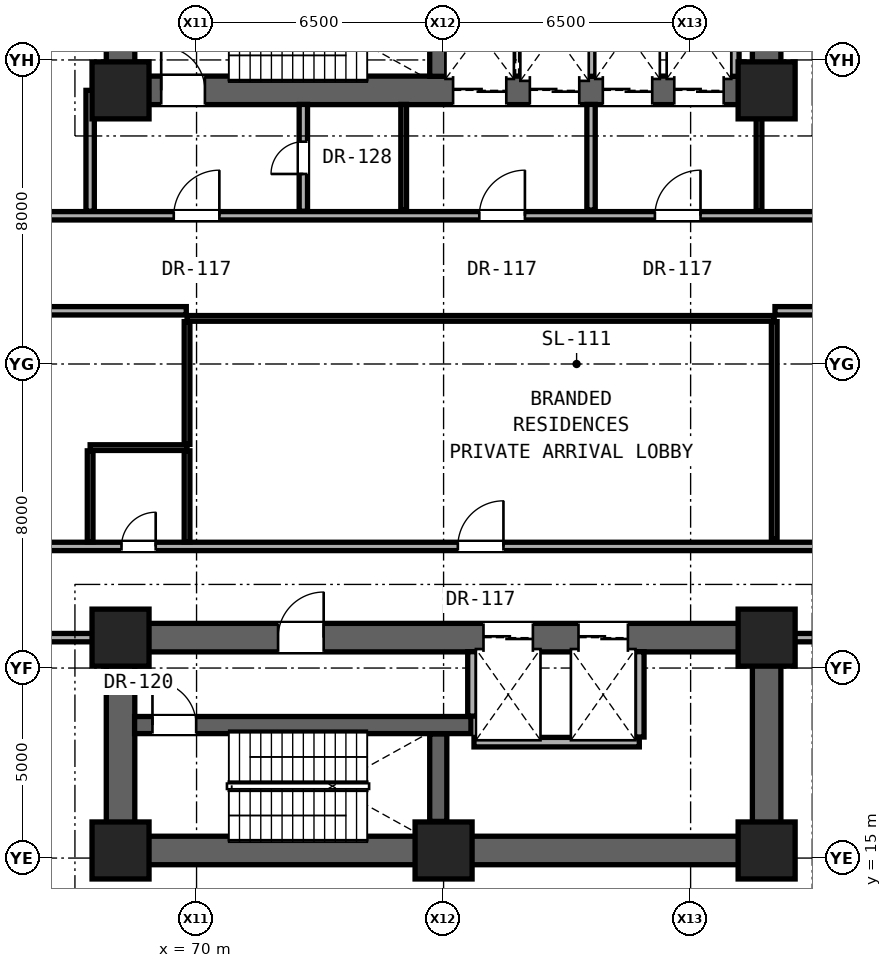
"""IFC4 building model, lengths in metres.
Left out: names, types, materials, properties, quantities, classifications, styles, units other than length and angle.
Written with IfcOpenShell. Run it as: python <this file> out.ifc"""

import sys

from ifc_helpers import new_model, si_unit, direction, frame, frame_2d, origin, origin_2d, place, context, subcontext, project, spatial, rectangle, extrude, element, fill, save


model = new_model("IFC4")
c1 = context("Model", 3, precision=1e-05, world=origin(), true_north=direction((0.0, 1.0)))
c2 = subcontext(c1, "Body", "Model", "MODEL_VIEW")
j1 = project(units=[si_unit("LENGTHUNIT", "METRE"), si_unit("PLANEANGLEUNIT", "RADIAN")], contexts=[c1])
p1 = place(None, origin())
s1 = spatial("IfcSite", under=j1, at=p1, CompositionType="ELEMENT")
p2 = place(p1, origin())
s2 = spatial("IfcBuilding", under=s1, at=p2, CompositionType="ELEMENT")
p3 = place(p2, origin())
s3 = spatial("IfcBuildingStorey", under=s2, at=p3, CompositionType="ELEMENT", Elevation=0.0)
for number, where, z_axis, x_axis in (
    (1, (68.0, 15.2, 0.0), (0.0, 0.0, 1.0), (1.0, 0.0, 0.0)),
    (2, (76.5, 15.2, 0.0), (0.0, 0.0, 1.0), (1.0, 0.0, 0.0)),
    (3, (85.0, 15.2, 0.0), (0.0, 0.0, 1.0), (1.0, 0.0, 0.0)),
    (4, (68.0, 20.8, 0.0), (0.0, 0.0, 1.0), (1.0, 0.0, 0.0)),
    (5, (85.0, 20.8, 0.0), (0.0, 0.0, 1.0), (1.0, 0.0, 0.0)),
    (6, (68.0, 35.2, 0.0), (0.0, 0.0, 1.0), (1.0, 0.0, 0.0)),
    (7, (85.0, 35.2, 0.0), (0.0, 0.0, 1.0), (1.0, 0.0, 0.0)),
):
    element("IfcColumn", number, at=place(p3, frame(where, z_axis=z_axis, x_axis=x_axis)), inside=s3, PredefinedType="COLUMN", context=c2, shape_type="SweptSolid", body=[
        extrude(rectangle(XDim=1.5, YDim=1.5, at=origin_2d()), origin(), (0.0, 0.0, 1.0), 5.2),
    ])
for number, where, z_axis, x_axis in (
    (8, (68.0, 35.2, 0.0), (0.0, 0.0, 1.0), (0.0, 1.0, 0.0)),
    (9, (85.0, 35.2, 0.0), (0.0, 0.0, 1.0), (0.0, 1.0, 0.0)),
):
    element("IfcWall", number, at=place(p3, frame(where, z_axis=z_axis, x_axis=x_axis)), inside=s3, PredefinedType="SHEAR", context=c2, shape_type="SweptSolid", body=[
        extrude(rectangle(XDim=5.6, YDim=0.75, at=frame_2d((2.8, 0.0))), origin(), (0.0, 0.0, 1.0), 4.88),
    ])
p4 = place(p3, frame((68.0, 35.2, 0.0), z_axis=(0.0, 0.0, 1.0), x_axis=(1.0, 0.0, 0.0)))
e10 = element("IfcWall", 10, at=p4, inside=s3, PredefinedType="SHEAR", context=c2, shape_type="SweptSolid", body=[
    extrude(rectangle(XDim=17.0, YDim=0.75, at=frame_2d((8.5, 0.0))), origin(), (0.0, 0.0, 1.0), 4.88),
])
p5 = place(p4, frame((1.07, 0.0, 0.0)))
e11 = element("IfcOpeningElement", 11, at=p5, cuts=e10, PredefinedType="OPENING", context=c2, shape_type="SweptSolid", body=[
    extrude(rectangle(XDim=1.15, YDim=2.2, at=frame_2d((0.575, 1.1))), frame((0.0, 0.385, 0.0), z_axis=(0.0, -1.0, 0.0), x_axis=(1.0, 0.0, 0.0)), (0.0, 0.0, 1.0), 0.77),
])
p6 = place(p4, frame((8.75, 0.0, 0.0)))
e12 = element("IfcOpeningElement", 12, at=p6, cuts=e10, PredefinedType="OPENING", context=c2, shape_type="SweptSolid", body=[
    extrude(rectangle(XDim=1.4, YDim=2.35, at=frame_2d((0.7, 1.175))), frame((0.0, 0.385, 0.0), z_axis=(0.0, -1.0, 0.0), x_axis=(1.0, 0.0, 0.0)), (0.0, 0.0, 1.0), 0.77),
])
p7 = place(p4, frame((10.77, 0.0, 0.0)))
e13 = element("IfcOpeningElement", 13, at=p7, cuts=e10, PredefinedType="OPENING", context=c2, shape_type="SweptSolid", body=[
    extrude(rectangle(XDim=1.3, YDim=2.3, at=frame_2d((0.65, 1.15))), frame((0.0, 0.385, 0.0), z_axis=(0.0, -1.0, 0.0), x_axis=(1.0, 0.0, 0.0)), (0.0, 0.0, 1.0), 0.77),
])
p8 = place(p4, frame((12.69, 0.0, 0.0)))
e14 = element("IfcOpeningElement", 14, at=p8, cuts=e10, PredefinedType="OPENING", context=c2, shape_type="SweptSolid", body=[
    extrude(rectangle(XDim=1.3, YDim=2.3, at=frame_2d((0.65, 1.15))), frame((0.0, 0.385, 0.0), z_axis=(0.0, -1.0, 0.0), x_axis=(1.0, 0.0, 0.0)), (0.0, 0.0, 1.0), 0.77),
])
p9 = place(p4, frame((14.57, 0.0, 0.0)))
e15 = element("IfcOpeningElement", 15, at=p9, cuts=e10, PredefinedType="OPENING", context=c2, shape_type="SweptSolid", body=[
    extrude(rectangle(XDim=1.3, YDim=2.3, at=frame_2d((0.65, 1.15))), frame((0.0, 0.385, 0.0), z_axis=(0.0, -1.0, 0.0), x_axis=(1.0, 0.0, 0.0)), (0.0, 0.0, 1.0), 0.77),
])
p10 = place(p3, frame((68.0, 15.2, 0.0), z_axis=(0.0, 0.0, 1.0), x_axis=(1.0, 0.0, 0.0)))
e16 = element("IfcWall", 16, at=p10, inside=s3, PredefinedType="SHEAR", context=c2, shape_type="SweptSolid", body=[
    extrude(rectangle(XDim=17.0, YDim=0.75, at=frame_2d((8.5, 0.0))), origin(), (0.0, 0.0, 1.0), 4.88),
])
for number, where, z_axis, x_axis in (
    (17, (68.0, 15.2, 0.0), (0.0, 0.0, 1.0), (0.0, 1.0, 0.0)),
    (18, (85.0, 15.2, 0.0), (0.0, 0.0, 1.0), (0.0, 1.0, 0.0)),
):
    element("IfcWall", number, at=place(p3, frame(where, z_axis=z_axis, x_axis=x_axis)), inside=s3, PredefinedType="SHEAR", context=c2, shape_type="SweptSolid", body=[
        extrude(rectangle(XDim=5.6, YDim=0.75, at=frame_2d((2.8, 0.0))), origin(), (0.0, 0.0, 1.0), 4.88),
    ])
p11 = place(p3, frame((68.0, 20.8, 0.0), z_axis=(0.0, 0.0, 1.0), x_axis=(1.0, 0.0, 0.0)))
e19 = element("IfcWall", 19, at=p11, inside=s3, PredefinedType="SHEAR", context=c2, shape_type="SweptSolid", body=[
    extrude(rectangle(XDim=17.0, YDim=0.75, at=frame_2d((8.5, 0.0))), origin(), (0.0, 0.0, 1.0), 4.88),
])
p12 = place(p11, frame((4.145, 0.0, 0.0)))
e20 = element("IfcOpeningElement", 20, at=p12, cuts=e19, PredefinedType="OPENING", context=c2, shape_type="SweptSolid", body=[
    extrude(rectangle(XDim=1.2, YDim=2.25, at=frame_2d((0.6, 1.125))), frame((0.0, 0.385, 0.0), z_axis=(0.0, -1.0, 0.0), x_axis=(1.0, 0.0, 0.0)), (0.0, 0.0, 1.0), 0.77),
])
p13 = place(p11, frame((9.55, 0.0, 0.0)))
e21 = element("IfcOpeningElement", 21, at=p13, cuts=e19, PredefinedType="OPENING", context=c2, shape_type="SweptSolid", body=[
    extrude(rectangle(XDim=1.3, YDim=2.3, at=frame_2d((0.65, 1.15))), frame((0.0, 0.385, 0.0), z_axis=(0.0, -1.0, 0.0), x_axis=(1.0, 0.0, 0.0)), (0.0, 0.0, 1.0), 0.77),
])
p14 = place(p11, frame((12.05, 0.0, 0.0)))
e22 = element("IfcOpeningElement", 22, at=p14, cuts=e19, PredefinedType="OPENING", context=c2, shape_type="SweptSolid", body=[
    extrude(rectangle(XDim=1.3, YDim=2.3, at=frame_2d((0.65, 1.15))), frame((0.0, 0.385, 0.0), z_axis=(0.0, -1.0, 0.0), x_axis=(1.0, 0.0, 0.0)), (0.0, 0.0, 1.0), 0.77),
])
p15 = place(p3, frame((77.3, 18.05, 0.0), z_axis=(0.0, 0.0, 1.0), x_axis=(1.0, 0.0, 0.0)))
e23 = element("IfcWall", 23, at=p15, inside=s3, PredefinedType="SOLIDWALL", context=c2, shape_type="SweptSolid", body=[
    extrude(rectangle(XDim=4.35, YDim=0.25, at=frame_2d((2.175, 0.0))), origin(), (0.0, 0.0, 1.0), 4.88),
])
p16 = place(p3, frame((68.37, 18.5, 0.0), z_axis=(0.0, 0.0, 1.0), x_axis=(1.0, 0.0, 0.0)))
e24 = element("IfcWall", 24, at=p16, inside=s3, PredefinedType="SHEAR", context=c2, shape_type="SweptSolid", body=[
    extrude(rectangle(XDim=8.85, YDim=0.45, at=frame_2d((4.425, 0.0))), origin(), (0.0, 0.0, 1.0), 4.88),
])
p17 = place(p16, frame((0.47, 0.0, 0.0)))
e25 = element("IfcOpeningElement", 25, at=p17, cuts=e24, PredefinedType="OPENING", context=c2, shape_type="SweptSolid", body=[
    extrude(rectangle(XDim=1.15, YDim=2.2, at=frame_2d((0.575, 1.1))), frame((0.0, 0.235, 0.0), z_axis=(0.0, -1.0, 0.0), x_axis=(1.0, 0.0, 0.0)), (0.0, 0.0, 1.0), 0.47),
])
p18 = place(p3, frame((61.8, 20.8, 0.0), z_axis=(0.0, 0.0, 1.0), x_axis=(1.0, 0.0, 0.0)))
e26 = element("IfcWall", 26, at=p18, inside=s3, PredefinedType="SOLIDWALL", context=c2, shape_type="SweptSolid", body=[
    extrude(rectangle(XDim=5.83, YDim=0.22, at=frame_2d((2.915, 0.0))), origin(), (0.0, 0.0, 1.0), 3.772),
])
p19 = place(p3, frame((85.37, 20.8, 0.0), z_axis=(0.0, 0.0, 1.0), x_axis=(1.0, 0.0, 0.0)))
e27 = element("IfcWall", 27, at=p19, inside=s3, PredefinedType="SOLIDWALL", context=c2, shape_type="SweptSolid", body=[
    extrude(rectangle(XDim=5.58, YDim=0.22, at=frame_2d((2.79, 0.0))), origin(), (0.0, 0.0, 1.0), 3.772),
])
p20 = place(p3, frame((61.8, 23.2, 0.0), z_axis=(0.0, 0.0, 1.0), x_axis=(1.0, 0.0, 0.0)))
e28 = element("IfcWall", 28, at=p20, inside=s3, PredefinedType="SOLIDWALL", context=c2, shape_type="SweptSolid", body=[
    extrude(rectangle(XDim=29.15, YDim=0.22, at=frame_2d((14.575, 0.0))), origin(), (0.0, 0.0, 1.0), 3.945),
])
p21 = place(p20, frame((6.225, 0.0, 0.0)))
e29 = element("IfcOpeningElement", 29, at=p21, cuts=e28, PredefinedType="OPENING", context=c2, shape_type="SweptSolid", body=[
    extrude(rectangle(XDim=0.9, YDim=2.1, at=frame_2d((0.45, 1.05))), frame((0.0, 0.12, 0.0), z_axis=(0.0, -1.0, 0.0), x_axis=(1.0, 0.0, 0.0)), (0.0, 0.0, 1.0), 0.24),
])
p22 = place(p20, frame((15.075, 0.0, 0.0)))
e30 = element("IfcOpeningElement", 30, at=p22, cuts=e28, PredefinedType="OPENING", context=c2, shape_type="SweptSolid", body=[
    extrude(rectangle(XDim=1.2, YDim=2.25, at=frame_2d((0.6, 1.125))), frame((0.0, 0.12, 0.0), z_axis=(0.0, -1.0, 0.0), x_axis=(1.0, 0.0, 0.0)), (0.0, 0.0, 1.0), 0.24),
])
p23 = place(p3, frame((67.2, 25.8, 0.0), z_axis=(0.0, 0.0, 1.0), x_axis=(1.0, 0.0, 0.0)))
e31 = element("IfcWall", 31, at=p23, inside=s3, PredefinedType="PARTITIONING", context=c2, shape_type="SweptSolid", body=[
    extrude(rectangle(XDim=2.55, YDim=0.15, at=frame_2d((1.275, 0.0))), origin(), (0.0, 0.0, 1.0), 3.945),
])
p24 = place(p3, frame((69.75, 29.2, 0.0), z_axis=(0.0, 0.0, 1.0), x_axis=(1.0, 0.0, 0.0)))
e32 = element("IfcWall", 32, at=p24, inside=s3, PredefinedType="PARTITIONING", context=c2, shape_type="SweptSolid", body=[
    extrude(rectangle(XDim=15.45, YDim=0.15, at=frame_2d((7.725, 0.0))), origin(), (0.0, 0.0, 1.0), 3.945),
])
p25 = place(p3, frame((61.8, 29.4, 0.0), z_axis=(0.0, 0.0, 1.0), x_axis=(1.0, 0.0, 0.0)))
e33 = element("IfcWall", 33, at=p25, inside=s3, PredefinedType="SOLIDWALL", context=c2, shape_type="SweptSolid", body=[
    extrude(rectangle(XDim=7.93, YDim=0.22, at=frame_2d((3.965, 0.0))), origin(), (0.0, 0.0, 1.0), 3.945),
])
p26 = place(p3, frame((85.22, 29.4, 0.0), z_axis=(0.0, 0.0, 1.0), x_axis=(1.0, 0.0, 0.0)))
e34 = element("IfcWall", 34, at=p26, inside=s3, PredefinedType="SOLIDWALL", context=c2, shape_type="SweptSolid", body=[
    extrude(rectangle(XDim=5.73, YDim=0.22, at=frame_2d((2.865, 0.0))), origin(), (0.0, 0.0, 1.0), 4.016),
])
p27 = place(p3, frame((61.8, 31.9, 0.0), z_axis=(0.0, 0.0, 1.0), x_axis=(1.0, 0.0, 0.0)))
e35 = element("IfcWall", 35, at=p27, inside=s3, PredefinedType="SOLIDWALL", context=c2, shape_type="SweptSolid", body=[
    extrude(rectangle(XDim=29.15, YDim=0.22, at=frame_2d((14.575, 0.0))), origin(), (0.0, 0.0, 1.0), 3.945),
])
p28 = place(p27, frame((7.6, 0.0, 0.0)))
e36 = element("IfcOpeningElement", 36, at=p28, cuts=e35, PredefinedType="OPENING", context=c2, shape_type="SweptSolid", body=[
    extrude(rectangle(XDim=1.2, YDim=2.25, at=frame_2d((0.6, 1.125))), frame((0.0, 0.12, 0.0), z_axis=(0.0, -1.0, 0.0), x_axis=(1.0, 0.0, 0.0)), (0.0, 0.0, 1.0), 0.24),
])
p29 = place(p27, frame((20.26, 0.0, 0.0)))
e37 = element("IfcOpeningElement", 37, at=p29, cuts=e35, PredefinedType="OPENING", context=c2, shape_type="SweptSolid", body=[
    extrude(rectangle(XDim=1.2, YDim=2.25, at=frame_2d((0.6, 1.125))), frame((0.0, 0.12, 0.0), z_axis=(0.0, -1.0, 0.0), x_axis=(1.0, 0.0, 0.0)), (0.0, 0.0, 1.0), 0.24),
])
p30 = place(p27, frame((15.64, 0.0, 0.0)))
e38 = element("IfcOpeningElement", 38, at=p30, cuts=e35, PredefinedType="OPENING", context=c2, shape_type="SweptSolid", body=[
    extrude(rectangle(XDim=1.2, YDim=2.25, at=frame_2d((0.6, 1.125))), frame((0.0, 0.12, 0.0), z_axis=(0.0, -1.0, 0.0), x_axis=(1.0, 0.0, 0.0)), (0.0, 0.0, 1.0), 0.24),
])
p31 = place(p3, frame((67.2, 23.32, 0.0), z_axis=(0.0, 0.0, 1.0), x_axis=(0.0, 1.0, 0.0)))
e39 = element("IfcWall", 39, at=p31, inside=s3, PredefinedType="PARTITIONING", context=c2, shape_type="SweptSolid", body=[
    extrude(rectangle(XDim=2.395, YDim=0.15, at=frame_2d((1.198, 0.0))), origin(), (0.0, 0.0, 1.0), 4.88),
])
p32 = place(p3, frame((67.2, 32.02, 0.0), z_axis=(0.0, 0.0, 1.0), x_axis=(0.0, 1.0, 0.0)))
e40 = element("IfcWall", 40, at=p32, inside=s3, PredefinedType="SOLIDWALL", context=c2, shape_type="SweptSolid", body=[
    extrude(rectangle(XDim=3.18, YDim=0.22, at=frame_2d((1.59, 0.0))), origin(), (0.0, 0.0, 1.0), 3.772),
])
p33 = place(p3, frame((69.75, 23.32, 0.0), z_axis=(0.0, 0.0, 1.0), x_axis=(0.0, 1.0, 0.0)))
e41 = element("IfcWall", 41, at=p33, inside=s3, PredefinedType="PARTITIONING", context=c2, shape_type="SweptSolid", body=[
    extrude(rectangle(XDim=2.395, YDim=0.15, at=frame_2d((1.198, 0.0))), origin(), (0.0, 0.0, 1.0), 4.88),
])
p34 = place(p3, frame((69.75, 25.885, 0.0), z_axis=(0.0, 0.0, 1.0), x_axis=(0.0, 1.0, 0.0)))
e42 = element("IfcWall", 42, at=p34, inside=s3, PredefinedType="PARTITIONING", context=c2, shape_type="SweptSolid", body=[
    extrude(rectangle(XDim=3.23, YDim=0.15, at=frame_2d((1.615, 0.0))), origin(), (0.0, 0.0, 1.0), 3.945),
])
p35 = place(p3, frame((72.81, 32.02, 0.0), z_axis=(0.0, 0.0, 1.0), x_axis=(0.0, 1.0, 0.0)))
e43 = element("IfcWall", 43, at=p35, inside=s3, PredefinedType="SOLIDWALL", context=c2, shape_type="SweptSolid", body=[
    extrude(rectangle(XDim=2.81, YDim=0.22, at=frame_2d((1.405, 0.0))), origin(), (0.0, 0.0, 1.0), 4.88),
])
p36 = place(p35, frame((0.98, 0.0, 0.0)))
e44 = element("IfcOpeningElement", 44, at=p36, cuts=e43, PredefinedType="OPENING", context=c2, shape_type="SweptSolid", body=[
    extrude(rectangle(XDim=0.85, YDim=2.01, at=frame_2d((0.425, 1.005))), frame((0.0, 0.12, 0.0), z_axis=(0.0, -1.0, 0.0), x_axis=(1.0, 0.0, 0.0)), (0.0, 0.0, 1.0), 0.24),
])
p37 = place(p3, frame((75.45, 32.05, 0.0), z_axis=(0.0, 0.0, 1.0), x_axis=(0.0, 1.0, 0.0)))
e45 = element("IfcWall", 45, at=p37, inside=s3, PredefinedType="PARTITIONING", context=c2, shape_type="SweptSolid", body=[
    extrude(rectangle(XDim=2.78, YDim=0.15, at=frame_2d((1.39, 0.0))), origin(), (0.0, 0.0, 1.0), 4.88),
])
p38 = place(p3, frame((76.36, 15.965, 0.0), z_axis=(0.0, 0.0, 1.0), x_axis=(0.0, 1.0, 0.0)))
e46 = element("IfcWall", 46, at=p38, inside=s3, PredefinedType="SHEAR", context=c2, shape_type="SweptSolid", body=[
    extrude(rectangle(XDim=2.3, YDim=0.45, at=frame_2d((1.15, 0.0))), origin(), (0.0, 0.0, 1.0), 4.88),
])
p39 = place(p3, frame((76.36, 35.57, 0.0), z_axis=(0.0, 0.0, 1.0), x_axis=(0.0, 1.0, 0.0)))
e47 = element("IfcWall", 47, at=p39, inside=s3, PredefinedType="SHEAR", context=c2, shape_type="SweptSolid", body=[
    extrude(rectangle(XDim=2.695, YDim=0.45, at=frame_2d((1.347, 0.0))), origin(), (0.0, 0.0, 1.0), 4.88),
])
p40 = place(p3, frame((77.26, 18.735, 0.0), z_axis=(0.0, 0.0, 1.0), x_axis=(0.0, 1.0, 0.0)))
e48 = element("IfcWall", 48, at=p40, inside=s3, PredefinedType="SOLIDWALL", context=c2, shape_type="SweptSolid", body=[
    extrude(rectangle(XDim=1.695, YDim=0.25, at=frame_2d((0.847, 0.0))), origin(), (0.0, 0.0, 1.0), 4.88),
])
p41 = place(p3, frame((80.38, 32.05, 0.0), z_axis=(0.0, 0.0, 1.0), x_axis=(0.0, 1.0, 0.0)))
e49 = element("IfcWall", 49, at=p41, inside=s3, PredefinedType="SOLIDWALL", context=c2, shape_type="SweptSolid", body=[
    extrude(rectangle(XDim=2.78, YDim=0.22, at=frame_2d((1.39, 0.0))), origin(), (0.0, 0.0, 1.0), 4.88),
])
for number, where, z_axis, x_axis in (
    (50, (80.38, 35.57, 0.0), (0.0, 0.0, 1.0), (0.0, 1.0, 0.0)),
    (51, (81.65, 18.185, 0.0), (0.0, 0.0, 1.0), (0.0, 1.0, 0.0)),
    (52, (84.15, 35.57, 0.0), (0.0, 0.0, 1.0), (0.0, 1.0, 0.0)),
):
    element("IfcWall", number, at=place(p3, frame(where, z_axis=z_axis, x_axis=x_axis)), inside=s3, PredefinedType="SOLIDWALL", context=c2, shape_type="SweptSolid", body=[
        extrude(rectangle(XDim=2.245, YDim=0.25, at=frame_2d((1.123, 0.0))), origin(), (0.0, 0.0, 1.0), 4.88),
    ])
p42 = place(p3, frame((84.8, 32.02, 0.0), z_axis=(0.0, 0.0, 1.0), x_axis=(0.0, 1.0, 0.0)))
e53 = element("IfcWall", 53, at=p42, inside=s3, PredefinedType="PARTITIONING", context=c2, shape_type="SweptSolid", body=[
    extrude(rectangle(XDim=2.81, YDim=0.15, at=frame_2d((1.405, 0.0))), origin(), (0.0, 0.0, 1.0), 3.945),
])
p43 = place(p3, frame((85.2, 23.4, 0.0), z_axis=(0.0, 0.0, 1.0), x_axis=(0.0, 1.0, 0.0)))
e54 = element("IfcWall", 54, at=p43, inside=s3, PredefinedType="PARTITIONING", context=c2, shape_type="SweptSolid", body=[
    extrude(rectangle(XDim=5.715, YDim=0.15, at=frame_2d((2.857, 0.0))), origin(), (0.0, 0.0, 1.0), 3.945),
])
p44 = place(p28, origin())
e55 = element("IfcDoor", 55, at=p44, inside=s3, OperationType="SINGLE_SWING_RIGHT", PredefinedType="DOOR", context=c2, shape_type="SweptSolid", body=[
    extrude(rectangle(XDim=1.2, YDim=2.25, at=frame_2d((0.6, 1.125))), frame((0.0, 0.025, 0.0), z_axis=(0.0, -1.0, 0.0), x_axis=(1.0, 0.0, 0.0)), (0.0, 0.0, 1.0), 0.05),
])
fill(e36, e55)
p45 = place(p29, origin())
e56 = element("IfcDoor", 56, at=p45, inside=s3, OperationType="SINGLE_SWING_RIGHT", PredefinedType="DOOR", context=c2, shape_type="SweptSolid", body=[
    extrude(rectangle(XDim=1.2, YDim=2.25, at=frame_2d((0.6, 1.125))), frame((0.0, 0.025, 0.0), z_axis=(0.0, -1.0, 0.0), x_axis=(1.0, 0.0, 0.0)), (0.0, 0.0, 1.0), 0.05),
])
fill(e37, e56)
p46 = place(p5, origin())
e57 = element("IfcDoor", 57, at=p46, inside=s3, OperationType="SINGLE_SWING_LEFT", PredefinedType="DOOR", context=c2, shape_type="SweptSolid", body=[
    extrude(rectangle(XDim=1.15, YDim=2.2, at=frame_2d((0.575, 1.1))), frame((0.0, 0.025, 0.0), z_axis=(0.0, -1.0, 0.0), x_axis=(1.0, 0.0, 0.0)), (0.0, 0.0, 1.0), 0.05),
])
fill(e11, e57)
p47 = place(p30, origin())
e58 = element("IfcDoor", 58, at=p47, inside=s3, OperationType="SINGLE_SWING_RIGHT", PredefinedType="DOOR", context=c2, shape_type="SweptSolid", body=[
    extrude(rectangle(XDim=1.2, YDim=2.25, at=frame_2d((0.6, 1.125))), frame((0.0, 0.025, 0.0), z_axis=(0.0, -1.0, 0.0), x_axis=(1.0, 0.0, 0.0)), (0.0, 0.0, 1.0), 0.05),
])
fill(e38, e58)
p48 = place(p36, origin())
e59 = element("IfcDoor", 59, at=p48, inside=s3, OperationType="SINGLE_SWING_LEFT", PredefinedType="DOOR", context=c2, shape_type="SweptSolid", body=[
    extrude(rectangle(XDim=0.85, YDim=2.01, at=frame_2d((0.425, 1.005))), frame((0.0, 0.025, 0.0), z_axis=(0.0, -1.0, 0.0), x_axis=(1.0, 0.0, 0.0)), (0.0, 0.0, 1.0), 0.05),
])
fill(e44, e59)
p49 = place(p12, origin())
e60 = element("IfcDoor", 60, at=p49, inside=s3, OperationType="SINGLE_SWING_RIGHT", PredefinedType="DOOR", context=c2, shape_type="SweptSolid", body=[
    extrude(rectangle(XDim=1.2, YDim=2.25, at=frame_2d((0.6, 1.125))), frame((0.0, 0.025, 0.0), z_axis=(0.0, -1.0, 0.0), x_axis=(1.0, 0.0, 0.0)), (0.0, 0.0, 1.0), 0.05),
])
fill(e20, e60)
p50 = place(p17, origin())
e61 = element("IfcDoor", 61, at=p50, inside=s3, OperationType="SINGLE_SWING_LEFT", PredefinedType="DOOR", context=c2, shape_type="SweptSolid", body=[
    extrude(rectangle(XDim=1.15, YDim=2.2, at=frame_2d((0.575, 1.1))), frame((0.0, 0.025, 0.0), z_axis=(0.0, -1.0, 0.0), x_axis=(1.0, 0.0, 0.0)), (0.0, 0.0, 1.0), 0.05),
])
fill(e25, e61)
p51 = place(p21, origin())
e62 = element("IfcDoor", 62, at=p51, inside=s3, OperationType="SINGLE_SWING_RIGHT", PredefinedType="DOOR", context=c2, shape_type="SweptSolid", body=[
    extrude(rectangle(XDim=0.9, YDim=2.1, at=frame_2d((0.45, 1.05))), frame((0.0, 0.025, 0.0), z_axis=(0.0, -1.0, 0.0), x_axis=(1.0, 0.0, 0.0)), (0.0, 0.0, 1.0), 0.05),
])
fill(e29, e62)
p52 = place(p22, origin())
e63 = element("IfcDoor", 63, at=p52, inside=s3, OperationType="SINGLE_SWING_RIGHT", PredefinedType="DOOR", context=c2, shape_type="SweptSolid", body=[
    extrude(rectangle(XDim=1.2, YDim=2.25, at=frame_2d((0.6, 1.125))), frame((0.0, 0.025, 0.0), z_axis=(0.0, -1.0, 0.0), x_axis=(1.0, 0.0, 0.0)), (0.0, 0.0, 1.0), 0.05),
])
fill(e30, e63)
p53 = place(p6, origin())
e64 = element("IfcDoor", 64, at=p53, inside=s3, OperationType="DOUBLE_DOOR_SLIDING", PredefinedType="DOOR", context=c2, shape_type="SweptSolid", body=[
    extrude(rectangle(XDim=1.4, YDim=2.35, at=frame_2d((0.7, 1.175))), frame((0.0, 0.025, 0.0), z_axis=(0.0, -1.0, 0.0), x_axis=(1.0, 0.0, 0.0)), (0.0, 0.0, 1.0), 0.05),
])
fill(e12, e64)
p54 = place(p7, origin())
e65 = element("IfcDoor", 65, at=p54, inside=s3, OperationType="DOUBLE_DOOR_SLIDING", PredefinedType="DOOR", context=c2, shape_type="SweptSolid", body=[
    extrude(rectangle(XDim=1.3, YDim=2.3, at=frame_2d((0.65, 1.15))), frame((0.0, 0.025, 0.0), z_axis=(0.0, -1.0, 0.0), x_axis=(1.0, 0.0, 0.0)), (0.0, 0.0, 1.0), 0.05),
])
fill(e13, e65)
p55 = place(p8, origin())
e66 = element("IfcDoor", 66, at=p55, inside=s3, OperationType="DOUBLE_DOOR_SLIDING", PredefinedType="DOOR", context=c2, shape_type="SweptSolid", body=[
    extrude(rectangle(XDim=1.3, YDim=2.3, at=frame_2d((0.65, 1.15))), frame((0.0, 0.025, 0.0), z_axis=(0.0, -1.0, 0.0), x_axis=(1.0, 0.0, 0.0)), (0.0, 0.0, 1.0), 0.05),
])
fill(e14, e66)
p56 = place(p9, origin())
e67 = element("IfcDoor", 67, at=p56, inside=s3, OperationType="DOUBLE_DOOR_SLIDING", PredefinedType="DOOR", context=c2, shape_type="SweptSolid", body=[
    extrude(rectangle(XDim=1.3, YDim=2.3, at=frame_2d((0.65, 1.15))), frame((0.0, 0.025, 0.0), z_axis=(0.0, -1.0, 0.0), x_axis=(1.0, 0.0, 0.0)), (0.0, 0.0, 1.0), 0.05),
])
fill(e15, e67)
p57 = place(p13, origin())
e68 = element("IfcDoor", 68, at=p57, inside=s3, OperationType="DOUBLE_DOOR_SLIDING", PredefinedType="DOOR", context=c2, shape_type="SweptSolid", body=[
    extrude(rectangle(XDim=1.3, YDim=2.3, at=frame_2d((0.65, 1.15))), frame((0.0, 0.025, 0.0), z_axis=(0.0, -1.0, 0.0), x_axis=(1.0, 0.0, 0.0)), (0.0, 0.0, 1.0), 0.05),
])
fill(e21, e68)
p58 = place(p14, origin())
e69 = element("IfcDoor", 69, at=p58, inside=s3, OperationType="DOUBLE_DOOR_SLIDING", PredefinedType="DOOR", context=c2, shape_type="SweptSolid", body=[
    extrude(rectangle(XDim=1.3, YDim=2.3, at=frame_2d((0.65, 1.15))), frame((0.0, 0.025, 0.0), z_axis=(0.0, -1.0, 0.0), x_axis=(1.0, 0.0, 0.0)), (0.0, 0.0, 1.0), 0.05),
])
fill(e22, e69)
save(model, sys.argv[1])
